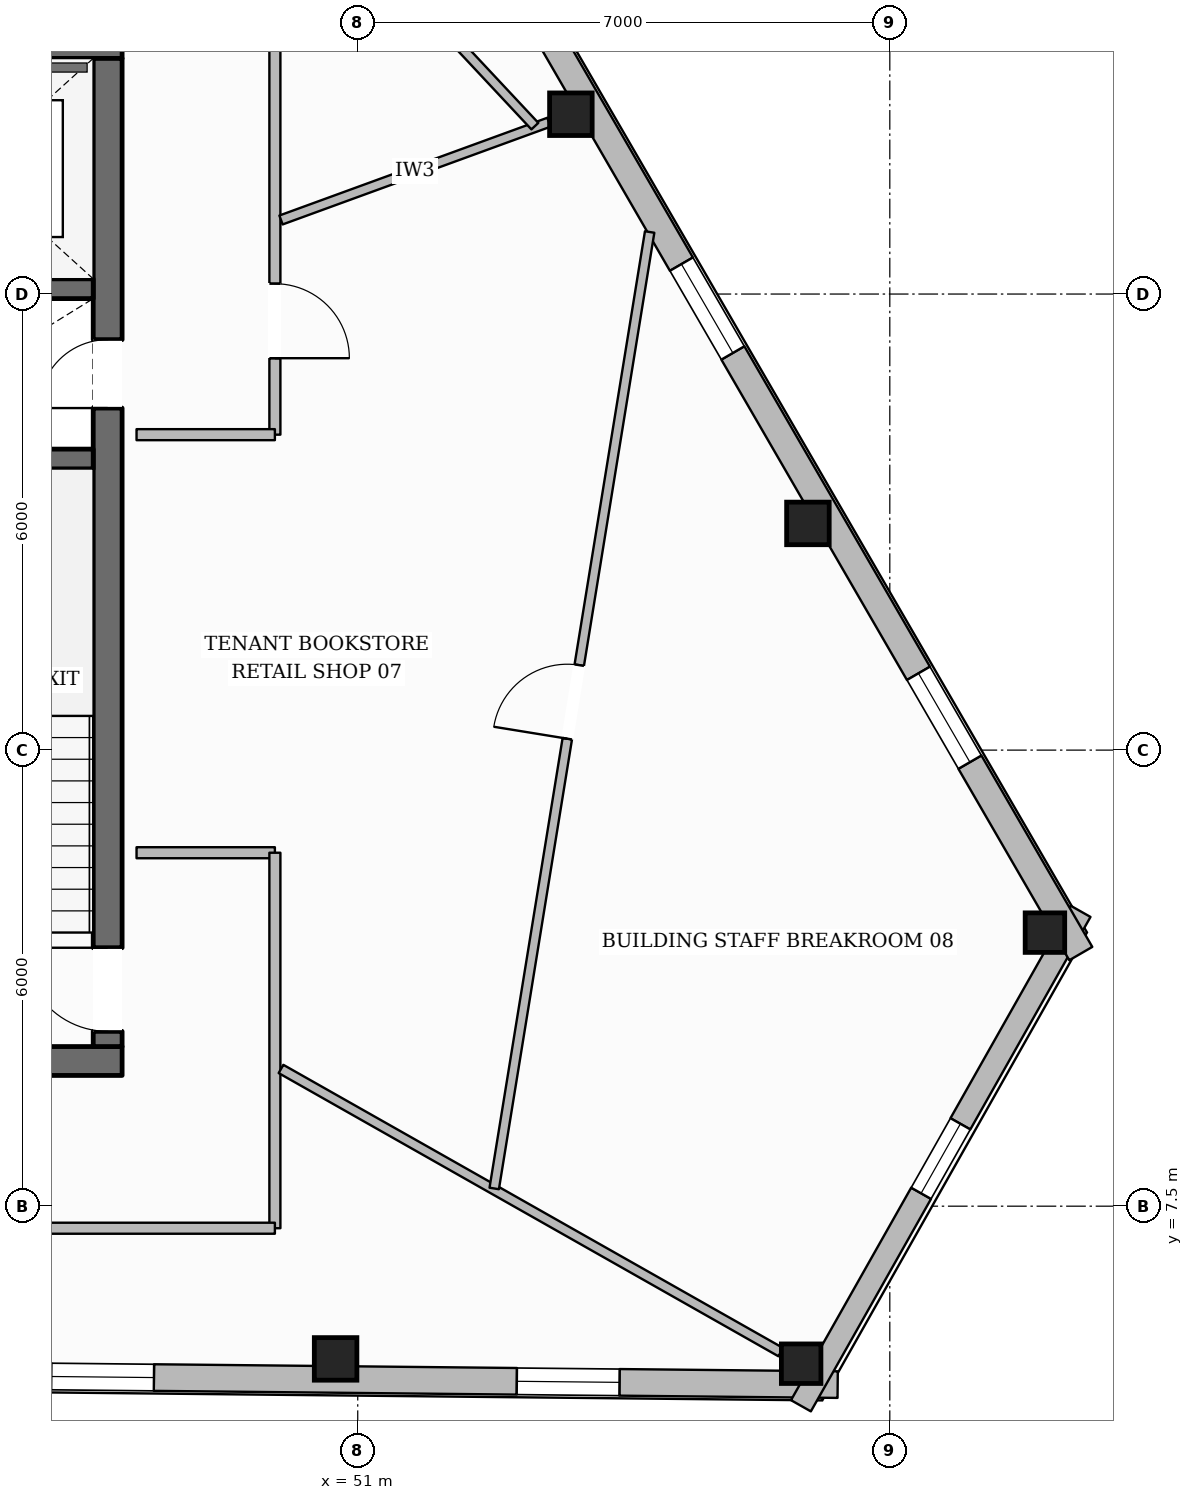
"""IFC4 building model, lengths in metres.
Left out: names, types, materials, properties, quantities, classifications, styles, units other than length and angle.
Written with IfcOpenShell. Run it as: python <this file> out.ifc"""

import sys

from ifc_helpers import new_model, si_unit, direction, frame, frame_2d, origin, origin_2d, place, context, subcontext, project, spatial, rectangle, hollow_rectangle, extrude, element, fill, save


model = new_model("IFC4")
c1 = context("Model", 3, precision=1e-05, world=origin(), true_north=direction((0.0, 1.0)))
c2 = subcontext(c1, "Body", "Model", "MODEL_VIEW")
j1 = project(units=[si_unit("LENGTHUNIT", "METRE"), si_unit("PLANEANGLEUNIT", "RADIAN")], contexts=[c1])
p1 = place(None, origin())
s1 = spatial("IfcSite", under=j1, at=p1, CompositionType="ELEMENT")
p2 = place(p1, origin())
s2 = spatial("IfcBuilding", under=s1, at=p2, CompositionType="ELEMENT")
p3 = place(p2, frame((0.0, 0.0, 247.2)))
s3 = spatial("IfcBuildingStorey", under=s2, at=p3, CompositionType="ELEMENT", Elevation=247.2)
p4 = place(p3, frame((28.1, 9.41, 0.0), z_axis=(0.0, 0.0, 1.0), x_axis=(1.0, 0.0, 0.0)))
e1 = element("IfcWall", 1, at=p4, inside=s3, PredefinedType="SOLIDWALL", context=c2, shape_type="SweptSolid", body=[
    extrude(rectangle(XDim=19.8, YDim=0.38, at=frame_2d((9.9, 0.0))), origin(), (0.0, 0.0, 1.0), 3.61),
])
p5 = place(p4, frame((10.4, 0.0, 0.0)))
e2 = element("IfcOpeningElement", 2, at=p5, cuts=e1, PredefinedType="OPENING", context=c2, shape_type="SweptSolid", body=[
    extrude(rectangle(XDim=1.4, YDim=2.2, at=frame_2d((0.7, 1.1))), frame((0.0, 0.2, 0.0), z_axis=(0.0, -1.0, 0.0), x_axis=(1.0, 0.0, 0.0)), (0.0, 0.0, 1.0), 0.4),
])
p6 = place(p3, frame((28.1, 22.79, 0.0), z_axis=(0.0, 0.0, 1.0), x_axis=(1.0, 0.0, 0.0)))
e3 = element("IfcWall", 3, at=p6, inside=s3, PredefinedType="SOLIDWALL", context=c2, shape_type="SweptSolid", body=[
    extrude(rectangle(XDim=19.8, YDim=0.38, at=frame_2d((9.9, 0.0))), origin(), (0.0, 0.0, 1.0), 3.61),
])
p7 = place(p6, frame((6.175, 0.0, 0.0)))
e4 = element("IfcOpeningElement", 4, at=p7, cuts=e3, PredefinedType="OPENING", context=c2, shape_type="SweptSolid", body=[
    extrude(rectangle(XDim=1.05, YDim=2.15, at=frame_2d((0.525, 1.075))), frame((0.0, 0.2, 0.0), z_axis=(0.0, -1.0, 0.0), x_axis=(1.0, 0.0, 0.0)), (0.0, 0.0, 1.0), 0.4),
])
p8 = place(p6, frame((12.575, 0.0, 0.0)))
e5 = element("IfcOpeningElement", 5, at=p8, cuts=e3, PredefinedType="OPENING", context=c2, shape_type="SweptSolid", body=[
    extrude(rectangle(XDim=1.05, YDim=2.15, at=frame_2d((0.525, 1.075))), frame((0.0, 0.2, 0.0), z_axis=(0.0, -1.0, 0.0), x_axis=(1.0, 0.0, 0.0)), (0.0, 0.0, 1.0), 0.4),
])
p9 = place(p3, frame((47.71, 9.6, 0.0), z_axis=(0.0, 0.0, 1.0), x_axis=(0.0, 1.0, 0.0)))
e6 = element("IfcWall", 6, at=p9, inside=s3, PredefinedType="SOLIDWALL", context=c2, shape_type="SweptSolid", body=[
    extrude(rectangle(XDim=13.0, YDim=0.38, at=frame_2d((6.5, 0.0))), origin(), (0.0, 0.0, 1.0), 3.61),
])
p10 = place(p9, frame((0.2, 0.0, 0.0)))
e7 = element("IfcOpeningElement", 7, at=p10, cuts=e6, PredefinedType="OPENING", context=c2, shape_type="SweptSolid", body=[
    extrude(rectangle(XDim=1.1, YDim=2.15, at=frame_2d((0.55, 1.075))), frame((0.0, 0.2, 0.0), z_axis=(0.0, -1.0, 0.0), x_axis=(1.0, 0.0, 0.0)), (0.0, 0.0, 1.0), 0.4),
])
p11 = place(p9, frame((8.4, 0.0, 0.0)))
e8 = element("IfcOpeningElement", 8, at=p11, cuts=e6, PredefinedType="OPENING", context=c2, shape_type="SweptSolid", body=[
    extrude(rectangle(XDim=0.9, YDim=2.1, at=frame_2d((0.45, 1.05))), frame((0.0, 0.2, 0.0), z_axis=(0.0, -1.0, 0.0), x_axis=(1.0, 0.0, 0.0)), (0.0, 0.0, 1.0), 0.4),
])
for number, where, z_axis, x_axis in (
    (9, (44.32, 17.33, 0.0), (0.0, 0.0, 1.0), (1.0, 0.0, 0.0)),
    (10, (44.32, 19.57, 0.0), (0.0, 0.0, 1.0), (1.0, 0.0, 0.0)),
):
    element("IfcWall", number, at=place(p3, frame(where, z_axis=z_axis, x_axis=x_axis)), inside=s3, PredefinedType="SHEAR", context=c2, shape_type="SweptSolid", body=[
        extrude(rectangle(XDim=3.2, YDim=0.26, at=frame_2d((1.6, 0.0))), origin(), (0.0, 0.0, 1.0), 3.61),
    ])
p12 = place(p3, frame((50.709, 5.491, 0.0), z_axis=(0.0, 0.0, 1.0), x_axis=(1.0, 0.0, 0.0)))
e11 = element("IfcColumn", 11, at=p12, inside=s3, PredefinedType="COLUMN", context=c2, shape_type="SweptSolid", body=[
    extrude(hollow_rectangle(XDim=0.56, YDim=0.56, WallThickness=0.025, at=origin_2d()), origin(), (0.0, 0.0, 1.0), 3.61),
])
for number, where, z_axis, x_axis in (
    (12, (56.833, 5.428, 0.0), (0.0, 0.0, 1.0), (1.0, 0.0, 0.0)),
    (13, (60.041, 11.099, 0.0), (0.0, 0.0, 1.0), (1.0, 0.0, 0.0)),
):
    element("IfcColumn", number, at=place(p3, frame(where, z_axis=z_axis, x_axis=x_axis)), inside=s3, PredefinedType="COLUMN", context=c2, shape_type="SweptSolid", body=[
        extrude(hollow_rectangle(XDim=0.52, YDim=0.52, WallThickness=0.024, at=origin_2d()), origin(), (0.0, 0.0, 1.0), 3.61),
    ])
for number, where, z_axis, x_axis in (
    (14, (56.923, 16.482, 0.0), (0.0, 0.0, 1.0), (1.0, 0.0, 0.0)),
    (15, (53.804, 21.866, 0.0), (0.0, 0.0, 1.0), (1.0, 0.0, 0.0)),
):
    element("IfcColumn", number, at=place(p3, frame(where, z_axis=z_axis, x_axis=x_axis)), inside=s3, PredefinedType="COLUMN", context=c2, shape_type="SweptSolid", body=[
        extrude(hollow_rectangle(XDim=0.56, YDim=0.56, WallThickness=0.025, at=origin_2d()), origin(), (0.0, 0.0, 1.0), 3.61),
    ])
p13 = place(p3, frame((57.314, 5.153, 0.0), z_axis=(0.0, 0.0, 1.0), x_axis=(-0.999946942722, 0.010301055321, 0.0)))
e16 = element("IfcWall", 16, at=p13, inside=s3, PredefinedType="STANDARD", context=c2, shape_type="SweptSolid", body=[
    extrude(rectangle(XDim=37.708, YDim=0.35, at=frame_2d((18.854, 0.0))), origin(), (0.0, 0.0, 1.0), 3.196),
])
p14 = place(p13, frame((33.497, 0.0, 0.65)))
e17 = element("IfcOpeningElement", 17, at=p14, cuts=e16, PredefinedType="OPENING", context=c2, shape_type="SweptSolid", body=[
    extrude(rectangle(XDim=1.35, YDim=1.75, at=frame_2d((0.675, 0.875))), frame((0.0, 0.185, 0.0), z_axis=(0.0, -1.0, 0.0), x_axis=(1.0, 0.0, 0.0)), (0.0, 0.0, 1.0), 0.37),
])
p15 = place(p13, frame((27.372, 0.0, 0.65)))
e18 = element("IfcOpeningElement", 18, at=p15, cuts=e16, PredefinedType="OPENING", context=c2, shape_type="SweptSolid", body=[
    extrude(rectangle(XDim=1.35, YDim=1.75, at=frame_2d((0.675, 0.875))), frame((0.0, 0.185, 0.0), z_axis=(0.0, -1.0, 0.0), x_axis=(1.0, 0.0, 0.0)), (0.0, 0.0, 1.0), 0.37),
])
p16 = place(p13, frame((21.246, 0.0, 0.65)))
e19 = element("IfcOpeningElement", 19, at=p16, cuts=e16, PredefinedType="OPENING", context=c2, shape_type="SweptSolid", body=[
    extrude(rectangle(XDim=1.35, YDim=1.75, at=frame_2d((0.675, 0.875))), frame((0.0, 0.185, 0.0), z_axis=(0.0, -1.0, 0.0), x_axis=(1.0, 0.0, 0.0)), (0.0, 0.0, 1.0), 0.37),
])
p17 = place(p13, frame((8.996, 0.0, 0.65)))
e20 = element("IfcOpeningElement", 20, at=p17, cuts=e16, PredefinedType="OPENING", context=c2, shape_type="SweptSolid", body=[
    extrude(rectangle(XDim=1.35, YDim=1.75, at=frame_2d((0.675, 0.875))), frame((0.0, 0.185, 0.0), z_axis=(0.0, -1.0, 0.0), x_axis=(1.0, 0.0, 0.0)), (0.0, 0.0, 1.0), 0.37),
])
p18 = place(p13, frame((2.871, 0.0, 0.65)))
e21 = element("IfcOpeningElement", 21, at=p18, cuts=e16, PredefinedType="OPENING", context=c2, shape_type="SweptSolid", body=[
    extrude(rectangle(XDim=1.35, YDim=1.75, at=frame_2d((0.675, 0.875))), frame((0.0, 0.185, 0.0), z_axis=(0.0, -1.0, 0.0), x_axis=(1.0, 0.0, 0.0)), (0.0, 0.0, 1.0), 0.37),
])
p19 = place(p3, frame((60.51, 11.379, 0.0), z_axis=(0.0, 0.0, 1.0), x_axis=(-0.492274685031, -0.870439908597, 0.0)))
e22 = element("IfcWall", 22, at=p19, inside=s3, PredefinedType="STANDARD", context=c2, shape_type="SweptSolid", body=[
    extrude(rectangle(XDim=7.473, YDim=0.3, at=frame_2d((3.737, 0.0))), origin(), (0.0, 0.0, 1.0), 3.196),
])
p20 = place(p19, frame((3.212, 0.0, 0.65)))
e23 = element("IfcOpeningElement", 23, at=p20, cuts=e22, PredefinedType="OPENING", context=c2, shape_type="SweptSolid", body=[
    extrude(rectangle(XDim=1.05, YDim=1.7, at=frame_2d((0.525, 0.85))), frame((0.0, 0.16, 0.0), z_axis=(0.0, -1.0, 0.0), x_axis=(1.0, 0.0, 0.0)), (0.0, 0.0, 1.0), 0.32),
])
p21 = place(p3, frame((41.327, 43.945, 0.0), z_axis=(0.0, 0.0, 1.0), x_axis=(0.501242173683, -0.865307045691, 0.0)))
e24 = element("IfcWall", 24, at=p21, inside=s3, PredefinedType="STANDARD", context=c2, shape_type="SweptSolid", body=[
    extrude(rectangle(XDim=38.277, YDim=0.35, at=frame_2d((19.138, 0.0))), origin(), (0.0, 0.0, 1.0), 3.196),
])
p22 = place(p21, frame((9.169, 0.0, 0.0)))
e25 = element("IfcOpeningElement", 25, at=p22, cuts=e24, PredefinedType="OPENING", context=c2, shape_type="SweptSolid", body=[
    extrude(rectangle(XDim=1.0, YDim=2.2, at=frame_2d((0.5, 1.1))), frame((0.0, 0.185, 0.0), z_axis=(0.0, -1.0, 0.0), x_axis=(1.0, 0.0, 0.0)), (0.0, 0.0, 1.0), 0.37),
])
p23 = place(p21, frame((34.016, 0.0, 0.65)))
e26 = element("IfcOpeningElement", 26, at=p23, cuts=e24, PredefinedType="OPENING", context=c2, shape_type="SweptSolid", body=[
    extrude(rectangle(XDim=1.35, YDim=1.75, at=frame_2d((0.675, 0.875))), frame((0.0, 0.185, 0.0), z_axis=(0.0, -1.0, 0.0), x_axis=(1.0, 0.0, 0.0)), (0.0, 0.0, 1.0), 0.37),
])
p24 = place(p21, frame((27.795, 0.0, 0.65)))
e27 = element("IfcOpeningElement", 27, at=p24, cuts=e24, PredefinedType="OPENING", context=c2, shape_type="SweptSolid", body=[
    extrude(rectangle(XDim=1.35, YDim=1.75, at=frame_2d((0.675, 0.875))), frame((0.0, 0.185, 0.0), z_axis=(0.0, -1.0, 0.0), x_axis=(1.0, 0.0, 0.0)), (0.0, 0.0, 1.0), 0.37),
])
p25 = place(p21, frame((21.573, 0.0, 0.65)))
e28 = element("IfcOpeningElement", 28, at=p25, cuts=e24, PredefinedType="OPENING", context=c2, shape_type="SweptSolid", body=[
    extrude(rectangle(XDim=1.35, YDim=1.75, at=frame_2d((0.675, 0.875))), frame((0.0, 0.185, 0.0), z_axis=(0.0, -1.0, 0.0), x_axis=(1.0, 0.0, 0.0)), (0.0, 0.0, 1.0), 0.37),
])
p26 = place(p21, frame((2.909, 0.0, 0.65)))
e29 = element("IfcOpeningElement", 29, at=p26, cuts=e24, PredefinedType="OPENING", context=c2, shape_type="SweptSolid", body=[
    extrude(rectangle(XDim=1.35, YDim=1.75, at=frame_2d((0.675, 0.875))), frame((0.0, 0.185, 0.0), z_axis=(0.0, -1.0, 0.0), x_axis=(1.0, 0.0, 0.0)), (0.0, 0.0, 1.0), 0.37),
])
p27 = place(p3, frame((49.91, 24.99, 0.0), z_axis=(0.0, 0.0, 1.0), x_axis=(0.0, -1.0, 0.0)))
e30 = element("IfcWall", 30, at=p27, inside=s3, PredefinedType="PARTITIONING", context=c2, shape_type="SweptSolid", body=[
    extrude(rectangle(XDim=7.34, YDim=0.145, at=frame_2d((3.67, 0.0))), origin(), (0.0, 0.0, 1.0), 3.349),
])
p28 = place(p27, frame((5.354, 0.0, 0.0)))
e31 = element("IfcOpeningElement", 31, at=p28, cuts=e30, PredefinedType="OPENING", context=c2, shape_type="SweptSolid", body=[
    extrude(rectangle(XDim=0.98, YDim=2.15, at=frame_2d((0.49, 1.075))), frame((0.0, 0.083, 0.0), z_axis=(0.0, -1.0, 0.0), x_axis=(1.0, 0.0, 0.0)), (0.0, 0.0, 1.0), 0.165),
])
for number, where, z_axis, x_axis in (
    (32, (49.91, 17.65, 0.0), (0.0, 0.0, 1.0), (-1.0, 0.0, 0.0)),
    (33, (48.09, 12.15, 0.0), (0.0, 0.0, 1.0), (1.0, 0.0, 0.0)),
):
    element("IfcWall", number, at=place(p3, frame(where, z_axis=z_axis, x_axis=x_axis)), inside=s3, PredefinedType="PARTITIONING", context=c2, shape_type="SweptSolid", body=[
        extrude(rectangle(XDim=1.82, YDim=0.145, at=frame_2d((0.91, 0.0))), origin(), (0.0, 0.0, 1.0), 3.61),
    ])
p29 = place(p3, frame((49.91, 12.15, 0.0), z_axis=(0.0, 0.0, 1.0), x_axis=(0.0, -1.0, 0.0)))
e34 = element("IfcWall", 34, at=p29, inside=s3, PredefinedType="PARTITIONING", context=c2, shape_type="SweptSolid", body=[
    extrude(rectangle(XDim=4.94, YDim=0.145, at=frame_2d((2.47, 0.0))), origin(), (0.0, 0.0, 1.0), 3.61),
])
p30 = place(p3, frame((49.91, 7.21, 0.0), z_axis=(0.0, 0.0, 1.0), x_axis=(-1.0, 0.0, 0.0)))
e35 = element("IfcWall", 35, at=p30, inside=s3, PredefinedType="PARTITIONING", context=c2, shape_type="SweptSolid", body=[
    extrude(rectangle(XDim=23.82, YDim=0.145, at=frame_2d((11.91, 0.0))), origin(), (0.0, 0.0, 1.0), 3.61),
])
p31 = place(p30, frame((10.606, 0.0, 0.0)))
e36 = element("IfcOpeningElement", 36, at=p31, cuts=e35, PredefinedType="OPENING", context=c2, shape_type="SweptSolid", body=[
    extrude(rectangle(XDim=0.98, YDim=2.15, at=frame_2d((0.49, 1.075))), frame((0.0, 0.083, 0.0), z_axis=(0.0, -1.0, 0.0), x_axis=(1.0, 0.0, 0.0)), (0.0, 0.0, 1.0), 0.165),
])
p32 = place(p3, frame((49.99, 20.474, 0.0), z_axis=(0.0, 0.0, 1.0), x_axis=(0.939443445382, 0.342703972735, 0.0)))
e37 = element("IfcWall", 37, at=p32, inside=s3, PredefinedType="PARTITIONING", context=c2, shape_type="SweptSolid", body=[
    extrude(rectangle(XDim=3.753, YDim=0.125, at=frame_2d((1.876, 0.0))), origin(), (0.0, 0.0, 1.0), 3.61),
])
p33 = place(p3, frame((49.99, 9.305, 0.0), z_axis=(0.0, 0.0, 1.0), x_axis=(0.870028652136, -0.49300116071, 0.0)))
e38 = element("IfcWall", 38, at=p33, inside=s3, PredefinedType="PARTITIONING", context=c2, shape_type="SweptSolid", body=[
    extrude(rectangle(XDim=7.557, YDim=0.125, at=frame_2d((3.779, 0.0))), origin(), (0.0, 0.0, 1.0), 3.246),
])
p34 = place(p3, frame((53.331, 21.709, 0.0), z_axis=(0.0, 0.0, 1.0), x_axis=(-0.683203310533, 0.730228208491, 0.0)))
e39 = element("IfcWall", 39, at=p34, inside=s3, PredefinedType="PARTITIONING", context=c2, shape_type="SweptSolid", body=[
    extrude(rectangle(XDim=10.913, YDim=0.125, at=frame_2d((5.457, 0.0))), origin(), (0.0, 0.0, 1.0), 3.349),
])
p35 = place(p34, frame((5.411, 0.0, 0.0)))
e40 = element("IfcOpeningElement", 40, at=p35, cuts=e39, PredefinedType="OPENING", context=c2, shape_type="SweptSolid", body=[
    extrude(rectangle(XDim=0.98, YDim=2.15, at=frame_2d((0.49, 1.075))), frame((0.0, 0.073, 0.0), z_axis=(0.0, -1.0, 0.0), x_axis=(1.0, 0.0, 0.0)), (0.0, 0.0, 1.0), 0.145),
])
p36 = place(p3, frame((52.796, 7.733, 0.0), z_axis=(0.0, 0.0, 1.0), x_axis=(0.160388372881, 0.987053985274, 0.0)))
e41 = element("IfcWall", 41, at=p36, inside=s3, PredefinedType="PARTITIONING", context=c2, shape_type="SweptSolid", body=[
    extrude(rectangle(XDim=12.748, YDim=0.125, at=frame_2d((6.374, 0.0))), origin(), (0.0, 0.0, 1.0), 3.349),
])
p37 = place(p36, frame((5.995, 0.0, 0.0)))
e42 = element("IfcOpeningElement", 42, at=p37, cuts=e41, PredefinedType="OPENING", context=c2, shape_type="SweptSolid", body=[
    extrude(rectangle(XDim=0.98, YDim=2.15, at=frame_2d((0.49, 1.075))), frame((0.0, 0.073, 0.0), z_axis=(0.0, -1.0, 0.0), x_axis=(1.0, 0.0, 0.0)), (0.0, 0.0, 1.0), 0.145),
])
p38 = place(p17, origin())
e43 = element("IfcWindow", 43, at=p38, inside=s3, PartitioningType="SINGLE_PANEL", PredefinedType="WINDOW", context=c2, shape_type="SweptSolid", body=[
    extrude(rectangle(XDim=1.35, YDim=1.75, at=frame_2d((0.675, 0.875))), frame((0.0, 0.03, 0.0), z_axis=(0.0, -1.0, 0.0), x_axis=(1.0, 0.0, 0.0)), (0.0, 0.0, 1.0), 0.06),
])
fill(e20, e43)
p39 = place(p18, origin())
e44 = element("IfcWindow", 44, at=p39, inside=s3, PartitioningType="SINGLE_PANEL", PredefinedType="WINDOW", context=c2, shape_type="SweptSolid", body=[
    extrude(rectangle(XDim=1.35, YDim=1.75, at=frame_2d((0.675, 0.875))), frame((0.0, 0.03, 0.0), z_axis=(0.0, -1.0, 0.0), x_axis=(1.0, 0.0, 0.0)), (0.0, 0.0, 1.0), 0.06),
])
fill(e21, e44)
p40 = place(p23, origin())
e45 = element("IfcWindow", 45, at=p40, inside=s3, PartitioningType="SINGLE_PANEL", PredefinedType="WINDOW", context=c2, shape_type="SweptSolid", body=[
    extrude(rectangle(XDim=1.35, YDim=1.75, at=frame_2d((0.675, 0.875))), frame((0.0, 0.03, 0.0), z_axis=(0.0, -1.0, 0.0), x_axis=(1.0, 0.0, 0.0)), (0.0, 0.0, 1.0), 0.06),
])
fill(e26, e45)
p41 = place(p24, origin())
e46 = element("IfcWindow", 46, at=p41, inside=s3, PartitioningType="SINGLE_PANEL", PredefinedType="WINDOW", context=c2, shape_type="SweptSolid", body=[
    extrude(rectangle(XDim=1.35, YDim=1.75, at=frame_2d((0.675, 0.875))), frame((0.0, 0.03, 0.0), z_axis=(0.0, -1.0, 0.0), x_axis=(1.0, 0.0, 0.0)), (0.0, 0.0, 1.0), 0.06),
])
fill(e27, e46)
p42 = place(p20, origin())
e47 = element("IfcWindow", 47, at=p42, inside=s3, PartitioningType="SINGLE_PANEL", PredefinedType="WINDOW", context=c2, shape_type="SweptSolid", body=[
    extrude(rectangle(XDim=1.05, YDim=1.7, at=frame_2d((0.525, 0.85))), frame((0.0, 0.03, 0.0), z_axis=(0.0, -1.0, 0.0), x_axis=(1.0, 0.0, 0.0)), (0.0, 0.0, 1.0), 0.06),
])
fill(e23, e47)
p43 = place(p10, origin())
e48 = element("IfcDoor", 48, at=p43, inside=s3, OperationType="SINGLE_SWING_RIGHT", PredefinedType="DOOR", context=c2, shape_type="SweptSolid", body=[
    extrude(rectangle(XDim=1.1, YDim=2.15, at=frame_2d((0.55, 1.075))), frame((0.0, 0.025, 0.0), z_axis=(0.0, -1.0, 0.0), x_axis=(1.0, 0.0, 0.0)), (0.0, 0.0, 1.0), 0.05),
])
fill(e7, e48)
p44 = place(p11, origin())
e49 = element("IfcDoor", 49, at=p44, inside=s3, OperationType="SINGLE_SWING_LEFT", PredefinedType="DOOR", context=c2, shape_type="SweptSolid", body=[
    extrude(rectangle(XDim=0.9, YDim=2.1, at=frame_2d((0.45, 1.05))), frame((0.0, 0.025, 0.0), z_axis=(0.0, -1.0, 0.0), x_axis=(1.0, 0.0, 0.0)), (0.0, 0.0, 1.0), 0.05),
])
fill(e8, e49)
p45 = place(p28, origin())
e50 = element("IfcDoor", 50, at=p45, inside=s3, OperationType="SINGLE_SWING_RIGHT", PredefinedType="DOOR", context=c2, shape_type="SweptSolid", body=[
    extrude(rectangle(XDim=0.98, YDim=2.15, at=frame_2d((0.49, 1.075))), frame((0.0, 0.025, 0.0), z_axis=(0.0, -1.0, 0.0), x_axis=(1.0, 0.0, 0.0)), (0.0, 0.0, 1.0), 0.05),
])
fill(e31, e50)
p46 = place(p37, origin())
e51 = element("IfcDoor", 51, at=p46, inside=s3, OperationType="SINGLE_SWING_LEFT", PredefinedType="DOOR", context=c2, shape_type="SweptSolid", body=[
    extrude(rectangle(XDim=0.98, YDim=2.15, at=frame_2d((0.49, 1.075))), frame((0.0, 0.025, 0.0), z_axis=(0.0, -1.0, 0.0), x_axis=(1.0, 0.0, 0.0)), (0.0, 0.0, 1.0), 0.05),
])
fill(e42, e51)
save(model, sys.argv[1])
